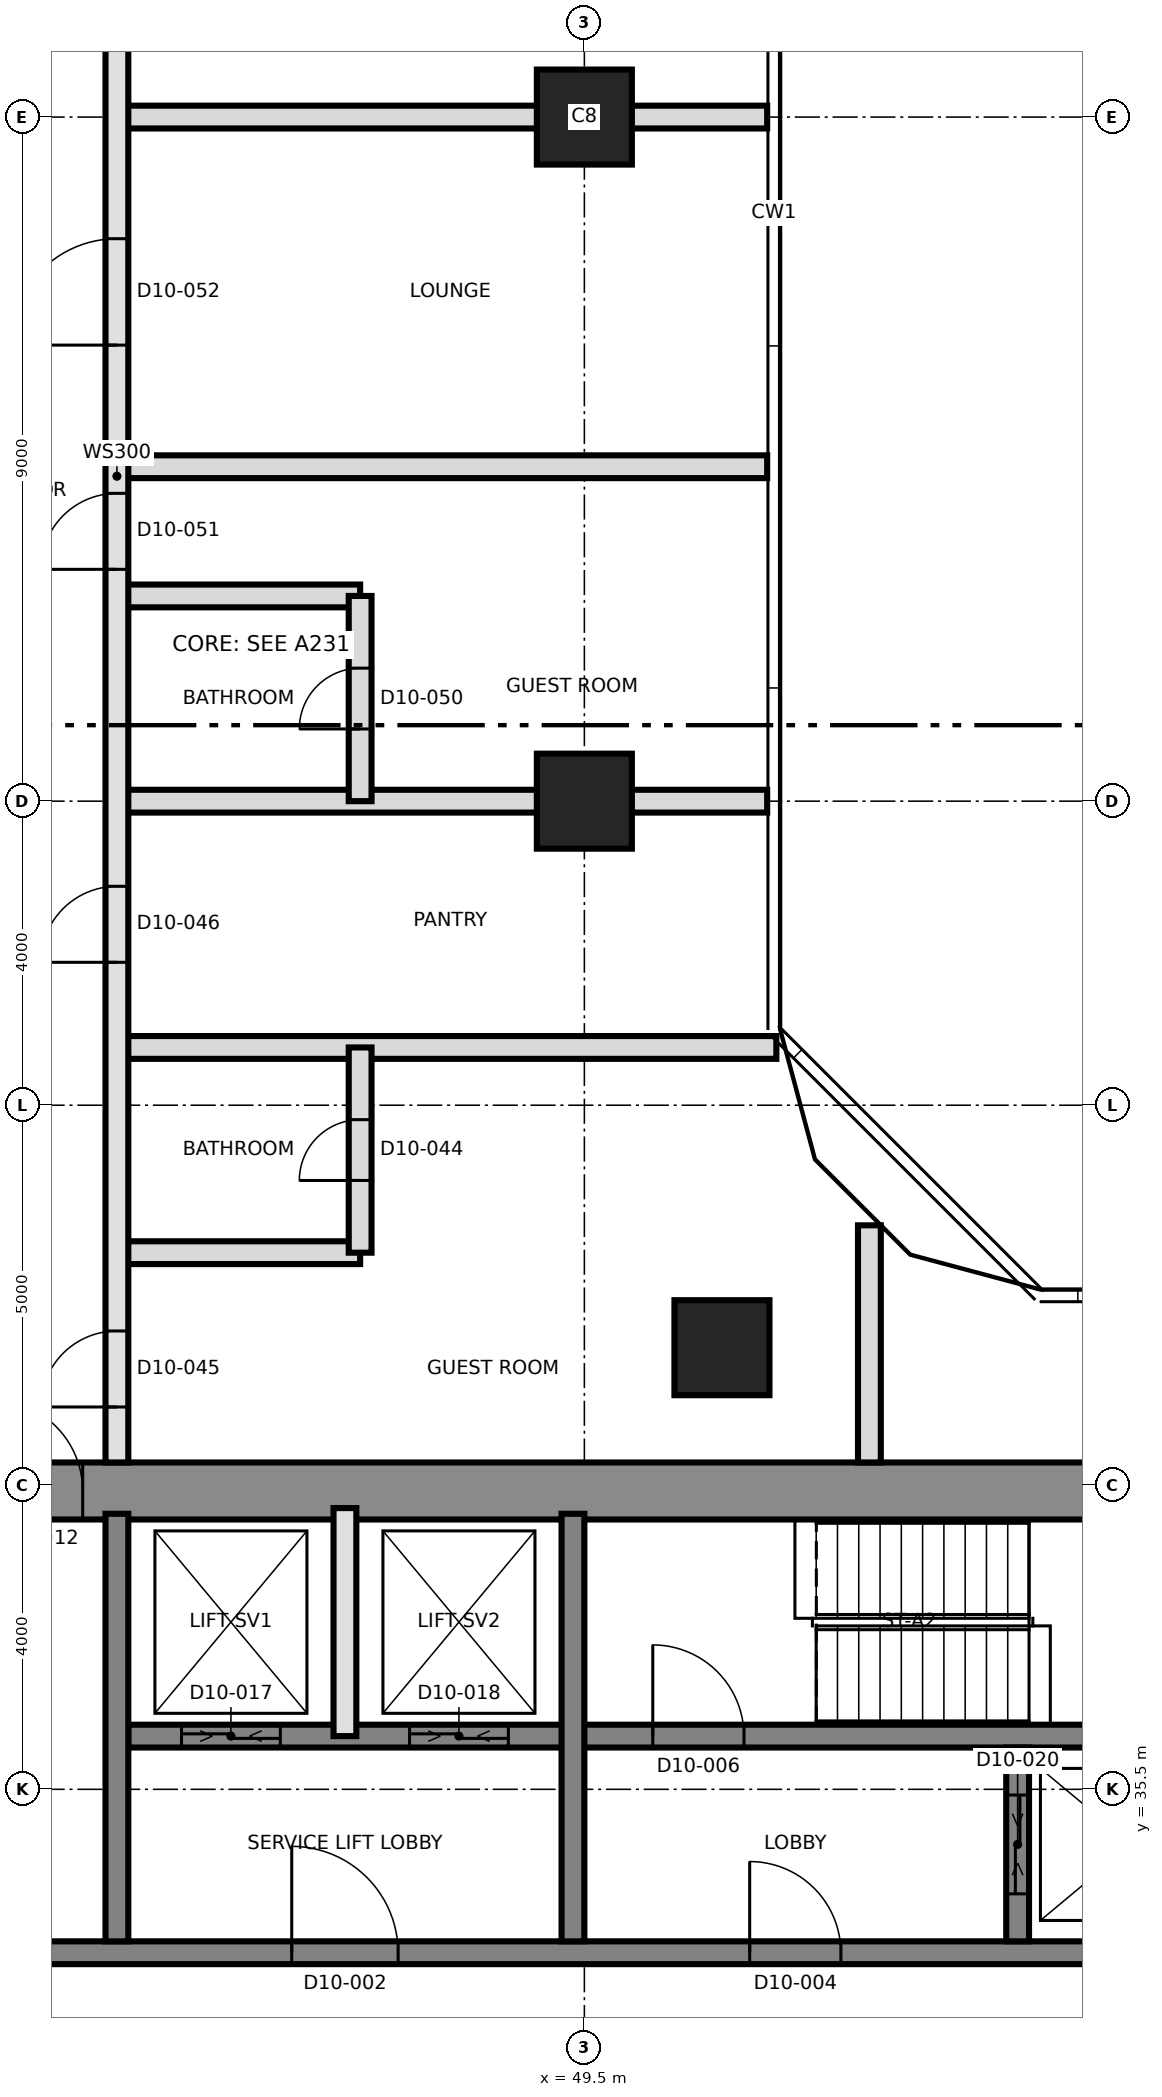
"""IFC4 building model, lengths in metres.
Left out: names, types, materials, properties, quantities, classifications, styles, units other than length and angle.
Written with IfcOpenShell. Run it as: python <this file> out.ifc"""

import sys

from ifc_helpers import new_model, si_unit, direction, frame, frame_2d, origin, origin_2d, place, context, subcontext, project, spatial, rectangle, extrude, element, fill, save


model = new_model("IFC4")
c1 = context("Model", 3, precision=1e-05, world=origin(), true_north=direction((0.0, 1.0)))
c2 = subcontext(c1, "Body", "Model", "MODEL_VIEW")
j1 = project(units=[si_unit("LENGTHUNIT", "METRE"), si_unit("PLANEANGLEUNIT", "RADIAN")], contexts=[c1])
p1 = place(None, origin())
s1 = spatial("IfcSite", under=j1, at=p1, CompositionType="ELEMENT")
p2 = place(p1, origin())
s2 = spatial("IfcBuilding", under=s1, at=p2, CompositionType="ELEMENT")
p3 = place(p2, frame((0.0, 0.0, 116.7)))
s3 = spatial("IfcBuildingStorey", under=s2, at=p3, CompositionType="ELEMENT", Elevation=116.7)
p4 = place(p3, frame((31.125, 39.425, 0.0), z_axis=(0.0, 0.0, 1.0), x_axis=(1.0, 0.0, 0.0)))
e1 = element("IfcWall", 1, at=p4, inside=s3, PredefinedType="SHEAR", context=c2, shape_type="SweptSolid", body=[
    extrude(rectangle(XDim=27.0, YDim=0.75, at=frame_2d((13.5, 0.0))), origin(), (0.0, 0.0, 1.0), 3.7),
])
p5 = place(p4, frame((10.575, 0.0, 0.0)))
e2 = element("IfcOpeningElement", 2, at=p5, cuts=e1, PredefinedType="OPENING", context=c2, shape_type="SweptSolid", body=[
    extrude(rectangle(XDim=1.2, YDim=2.1, at=frame_2d((0.6, 1.05))), frame((0.0, 0.385, 0.0), z_axis=(0.0, -1.0, 0.0), x_axis=(1.0, 0.0, 0.0)), (0.0, 0.0, 1.0), 0.77),
])
p6 = place(p3, frame((31.875, 33.35, 0.0), z_axis=(0.0, 0.0, 1.0), x_axis=(1.0, 0.0, 0.0)))
e3 = element("IfcWall", 3, at=p6, inside=s3, PredefinedType="SHEAR", context=c2, shape_type="SweptSolid", body=[
    extrude(rectangle(XDim=26.25, YDim=0.3, at=frame_2d((13.125, 0.0))), origin(), (0.0, 0.0, 1.0), 3.7),
])
p7 = place(p6, frame((13.775, 0.0, 0.0)))
e4 = element("IfcOpeningElement", 4, at=p7, cuts=e3, PredefinedType="OPENING", context=c2, shape_type="SweptSolid", body=[
    extrude(rectangle(XDim=1.4, YDim=2.1, at=frame_2d((0.7, 1.05))), frame((0.0, 0.16, 0.0), z_axis=(0.0, -1.0, 0.0), x_axis=(1.0, 0.0, 0.0)), (0.0, 0.0, 1.0), 0.32),
])
p8 = place(p6, frame((5.25, 0.0, 0.0)))
e5 = element("IfcOpeningElement", 5, at=p8, cuts=e3, PredefinedType="OPENING", context=c2, shape_type="SweptSolid", body=[
    extrude(rectangle(XDim=1.2, YDim=2.1, at=frame_2d((0.6, 1.05))), frame((0.0, 0.16, 0.0), z_axis=(0.0, -1.0, 0.0), x_axis=(1.0, 0.0, 0.0)), (0.0, 0.0, 1.0), 0.32),
])
p9 = place(p6, frame((19.8, 0.0, 0.0)))
e6 = element("IfcOpeningElement", 6, at=p9, cuts=e3, PredefinedType="OPENING", context=c2, shape_type="SweptSolid", body=[
    extrude(rectangle(XDim=1.2, YDim=2.1, at=frame_2d((0.6, 1.05))), frame((0.0, 0.16, 0.0), z_axis=(0.0, -1.0, 0.0), x_axis=(1.0, 0.0, 0.0)), (0.0, 0.0, 1.0), 0.32),
])
p10 = place(p3, frame((43.5, 36.2, 0.0), z_axis=(0.0, 0.0, 1.0), x_axis=(1.0, 0.0, 0.0)))
e7 = element("IfcWall", 7, at=p10, inside=s3, PredefinedType="SHEAR", context=c2, shape_type="SweptSolid", body=[
    extrude(rectangle(XDim=14.625, YDim=0.3, at=frame_2d((7.312, 0.0))), origin(), (0.0, 0.0, 1.0), 3.7),
])
p11 = place(p10, frame((6.9, 0.0, 0.0)))
e8 = element("IfcOpeningElement", 8, at=p11, cuts=e7, PredefinedType="OPENING", context=c2, shape_type="SweptSolid", body=[
    extrude(rectangle(XDim=1.2, YDim=2.1, at=frame_2d((0.6, 1.05))), frame((0.0, 0.16, 0.0), z_axis=(0.0, -1.0, 0.0), x_axis=(1.0, 0.0, 0.0)), (0.0, 0.0, 1.0), 0.32),
])
p12 = place(p10, frame((0.7, 0.0, 0.0)))
e9 = element("IfcOpeningElement", 9, at=p12, cuts=e7, PredefinedType="OPENING", context=c2, shape_type="SweptSolid", body=[
    extrude(rectangle(XDim=1.3, YDim=2.4, at=frame_2d((0.65, 1.2))), frame((0.0, 0.16, 0.0), z_axis=(0.0, -1.0, 0.0), x_axis=(1.0, 0.0, 0.0)), (0.0, 0.0, 1.0), 0.32),
])
p13 = place(p10, frame((3.7, 0.0, 0.0)))
e10 = element("IfcOpeningElement", 10, at=p13, cuts=e7, PredefinedType="OPENING", context=c2, shape_type="SweptSolid", body=[
    extrude(rectangle(XDim=1.3, YDim=2.4, at=frame_2d((0.65, 1.2))), frame((0.0, 0.16, 0.0), z_axis=(0.0, -1.0, 0.0), x_axis=(1.0, 0.0, 0.0)), (0.0, 0.0, 1.0), 0.32),
])
for number, where, z_axis, x_axis in (
    (11, (43.35, 33.5, 0.0), (0.0, 0.0, 1.0), (0.0, 1.0, 0.0)),
    (12, (49.35, 33.5, 0.0), (0.0, 0.0, 1.0), (0.0, 1.0, 0.0)),
):
    element("IfcWall", number, at=place(p3, frame(where, z_axis=z_axis, x_axis=x_axis)), inside=s3, PredefinedType="SHEAR", context=c2, shape_type="SweptSolid", body=[
        extrude(rectangle(XDim=5.625, YDim=0.3, at=frame_2d((2.812, 0.0))), origin(), (0.0, 0.0, 1.0), 3.7),
    ])
p14 = place(p3, frame((55.2, 33.5, 0.0), z_axis=(0.0, 0.0, 1.0), x_axis=(0.0, 1.0, 0.0)))
e13 = element("IfcWall", 13, at=p14, inside=s3, PredefinedType="SHEAR", context=c2, shape_type="SweptSolid", body=[
    extrude(rectangle(XDim=2.55, YDim=0.3, at=frame_2d((1.275, 0.0))), origin(), (0.0, 0.0, 1.0), 3.7),
])
p15 = place(p14, frame((0.625, 0.0, 0.0)))
e14 = element("IfcOpeningElement", 14, at=p15, cuts=e13, PredefinedType="OPENING", context=c2, shape_type="SweptSolid", body=[
    extrude(rectangle(XDim=1.3, YDim=2.4, at=frame_2d((0.65, 1.2))), frame((0.0, 0.16, 0.0), z_axis=(0.0, -1.0, 0.0), x_axis=(1.0, 0.0, 0.0)), (0.0, 0.0, 1.0), 0.32),
])
for number, where, z_axis, x_axis in (
    (15, (51.31, 41.31, 0.0), (0.0, 0.0, 1.0), (1.0, 0.0, 0.0)),
    (16, (49.5, 48.5, 0.0), (0.0, 0.0, 1.0), (1.0, 0.0, 0.0)),
    (17, (49.5, 57.5, 0.0), (0.0, 0.0, 1.0), (1.0, 0.0, 0.0)),
):
    element("IfcColumn", number, at=place(p3, frame(where, z_axis=z_axis, x_axis=x_axis)), inside=s3, PredefinedType="COLUMN", context=c2, shape_type="SweptSolid", body=[
        extrude(rectangle(XDim=1.25, YDim=1.25, at=origin_2d()), origin(), (0.0, 0.0, 1.0), 3.7),
    ])
p16 = place(p3, frame((46.35, 36.2, 0.0), z_axis=(0.0, 0.0, 1.0), x_axis=(0.0, 1.0, 0.0)))
e18 = element("IfcWall", 18, at=p16, inside=s3, PredefinedType="SOLIDWALL", context=c2, shape_type="SweptSolid", body=[
    extrude(rectangle(XDim=3.0, YDim=0.3, at=frame_2d((1.5, 0.0))), origin(), (0.0, 0.0, 1.0), 3.4),
])
p17 = place(p3, frame((43.35, 42.56, 0.0), z_axis=(0.0, 0.0, 1.0), x_axis=(1.0, 0.0, 0.0)))
e19 = element("IfcWall", 19, at=p17, inside=s3, PredefinedType="PARTITIONING", context=c2, shape_type="SweptSolid", body=[
    extrude(rectangle(XDim=3.2, YDim=0.3, at=frame_2d((1.6, 0.0))), origin(), (0.0, 0.0, 1.0), 3.4),
])
p18 = place(p3, frame((43.35, 45.26, 0.0), z_axis=(0.0, 0.0, 1.0), x_axis=(1.0, 0.0, 0.0)))
e20 = element("IfcWall", 20, at=p18, inside=s3, PredefinedType="PARTITIONING", context=c2, shape_type="SweptSolid", body=[
    extrude(rectangle(XDim=8.676, YDim=0.3, at=frame_2d((4.338, 0.0))), origin(), (0.0, 0.0, 1.0), 3.4),
])
p19 = place(p3, frame((43.35, 48.5, 0.0), z_axis=(0.0, 0.0, 1.0), x_axis=(1.0, 0.0, 0.0)))
e21 = element("IfcWall", 21, at=p19, inside=s3, PredefinedType="PARTITIONING", context=c2, shape_type="SweptSolid", body=[
    extrude(rectangle(XDim=8.555, YDim=0.3, at=frame_2d((4.277, 0.0))), origin(), (0.0, 0.0, 1.0), 3.4),
])
p20 = place(p3, frame((43.35, 51.2, 0.0), z_axis=(0.0, 0.0, 1.0), x_axis=(1.0, 0.0, 0.0)))
e22 = element("IfcWall", 22, at=p20, inside=s3, PredefinedType="PARTITIONING", context=c2, shape_type="SweptSolid", body=[
    extrude(rectangle(XDim=3.2, YDim=0.3, at=frame_2d((1.6, 0.0))), origin(), (0.0, 0.0, 1.0), 3.4),
])
for number, where, z_axis, x_axis in (
    (23, (43.35, 52.9, 0.0), (0.0, 0.0, 1.0), (1.0, 0.0, 0.0)),
    (24, (43.35, 57.5, 0.0), (0.0, 0.0, 1.0), (1.0, 0.0, 0.0)),
):
    element("IfcWall", number, at=place(p3, frame(where, z_axis=z_axis, x_axis=x_axis)), inside=s3, PredefinedType="PARTITIONING", context=c2, shape_type="SweptSolid", body=[
        extrude(rectangle(XDim=8.555, YDim=0.3, at=frame_2d((4.277, 0.0))), origin(), (0.0, 0.0, 1.0), 3.4),
    ])
p21 = place(p3, frame((43.35, 39.8, 0.0), z_axis=(0.0, 0.0, 1.0), x_axis=(0.0, 1.0, 0.0)))
e25 = element("IfcWall", 25, at=p21, inside=s3, PredefinedType="SOLIDWALL", context=c2, shape_type="SweptSolid", body=[
    extrude(rectangle(XDim=25.95, YDim=0.3, at=frame_2d((12.975, 0.0))), origin(), (0.0, 0.0, 1.0), 3.4),
])
p22 = place(p21, frame((0.73, 0.0, 0.0)))
e26 = element("IfcOpeningElement", 26, at=p22, cuts=e25, PredefinedType="OPENING", context=c2, shape_type="SweptSolid", body=[
    extrude(rectangle(XDim=1.0, YDim=2.1, at=frame_2d((0.5, 1.05))), frame((0.0, 0.16, 0.0), z_axis=(0.0, -1.0, 0.0), x_axis=(1.0, 0.0, 0.0)), (0.0, 0.0, 1.0), 0.32),
])
p23 = place(p21, frame((6.58, 0.0, 0.0)))
e27 = element("IfcOpeningElement", 27, at=p23, cuts=e25, PredefinedType="OPENING", context=c2, shape_type="SweptSolid", body=[
    extrude(rectangle(XDim=1.0, YDim=2.1, at=frame_2d((0.5, 1.05))), frame((0.0, 0.16, 0.0), z_axis=(0.0, -1.0, 0.0), x_axis=(1.0, 0.0, 0.0)), (0.0, 0.0, 1.0), 0.32),
])
p24 = place(p21, frame((11.75, 0.0, 0.0)))
e28 = element("IfcOpeningElement", 28, at=p24, cuts=e25, PredefinedType="OPENING", context=c2, shape_type="SweptSolid", body=[
    extrude(rectangle(XDim=1.0, YDim=2.1, at=frame_2d((0.5, 1.05))), frame((0.0, 0.16, 0.0), z_axis=(0.0, -1.0, 0.0), x_axis=(1.0, 0.0, 0.0)), (0.0, 0.0, 1.0), 0.32),
])
p25 = place(p21, frame((14.7, 0.0, 0.0)))
e29 = element("IfcOpeningElement", 29, at=p25, cuts=e25, PredefinedType="OPENING", context=c2, shape_type="SweptSolid", body=[
    extrude(rectangle(XDim=1.4, YDim=2.1, at=frame_2d((0.7, 1.05))), frame((0.0, 0.16, 0.0), z_axis=(0.0, -1.0, 0.0), x_axis=(1.0, 0.0, 0.0)), (0.0, 0.0, 1.0), 0.32),
])
p26 = place(p21, frame((19.7, 0.0, 0.0)))
e30 = element("IfcOpeningElement", 30, at=p26, cuts=e25, PredefinedType="OPENING", context=c2, shape_type="SweptSolid", body=[
    extrude(rectangle(XDim=1.0, YDim=2.4, at=frame_2d((0.5, 1.2))), frame((0.0, 0.16, 0.0), z_axis=(0.0, -1.0, 0.0), x_axis=(1.0, 0.0, 0.0)), (0.0, 0.0, 1.0), 0.32),
])
p27 = place(p3, frame((46.55, 42.56, 0.0), z_axis=(0.0, 0.0, 1.0), x_axis=(0.0, 1.0, 0.0)))
e31 = element("IfcWall", 31, at=p27, inside=s3, PredefinedType="PARTITIONING", context=c2, shape_type="SweptSolid", body=[
    extrude(rectangle(XDim=2.7, YDim=0.3, at=frame_2d((1.35, 0.0))), origin(), (0.0, 0.0, 1.0), 3.4),
])
p28 = place(p27, frame((0.95, 0.0, 0.0)))
e32 = element("IfcOpeningElement", 32, at=p28, cuts=e31, PredefinedType="OPENING", context=c2, shape_type="SweptSolid", body=[
    extrude(rectangle(XDim=0.8, YDim=2.1, at=frame_2d((0.4, 1.05))), frame((0.0, 0.16, 0.0), z_axis=(0.0, -1.0, 0.0), x_axis=(1.0, 0.0, 0.0)), (0.0, 0.0, 1.0), 0.32),
])
p29 = place(p3, frame((46.55, 48.5, 0.0), z_axis=(0.0, 0.0, 1.0), x_axis=(0.0, 1.0, 0.0)))
e33 = element("IfcWall", 33, at=p29, inside=s3, PredefinedType="PARTITIONING", context=c2, shape_type="SweptSolid", body=[
    extrude(rectangle(XDim=2.7, YDim=0.3, at=frame_2d((1.35, 0.0))), origin(), (0.0, 0.0, 1.0), 3.4),
])
p30 = place(p29, frame((0.95, 0.0, 0.0)))
e34 = element("IfcOpeningElement", 34, at=p30, cuts=e33, PredefinedType="OPENING", context=c2, shape_type="SweptSolid", body=[
    extrude(rectangle(XDim=0.8, YDim=2.1, at=frame_2d((0.4, 1.05))), frame((0.0, 0.16, 0.0), z_axis=(0.0, -1.0, 0.0), x_axis=(1.0, 0.0, 0.0)), (0.0, 0.0, 1.0), 0.32),
])
p31 = place(p3, frame((53.25, 39.8, 0.0), z_axis=(0.0, 0.0, 1.0), x_axis=(0.0, 1.0, 0.0)))
e35 = element("IfcWall", 35, at=p31, inside=s3, PredefinedType="PARTITIONING", context=c2, shape_type="SweptSolid", body=[
    extrude(rectangle(XDim=3.12, YDim=0.3, at=frame_2d((1.56, 0.0))), origin(), (0.0, 0.0, 1.0), 3.4),
])
p32 = place(p7, origin())
e36 = element("IfcDoor", 36, at=p32, inside=s3, OperationType="SINGLE_SWING_RIGHT", PredefinedType="DOOR", context=c2, shape_type="SweptSolid", body=[
    extrude(rectangle(XDim=1.4, YDim=2.1, at=frame_2d((0.7, 1.05))), frame((0.0, 0.025, 0.0), z_axis=(0.0, -1.0, 0.0), x_axis=(1.0, 0.0, 0.0)), (0.0, 0.0, 1.0), 0.05),
])
fill(e4, e36)
p33 = place(p9, origin())
e37 = element("IfcDoor", 37, at=p33, inside=s3, OperationType="SINGLE_SWING_RIGHT", PredefinedType="DOOR", context=c2, shape_type="SweptSolid", body=[
    extrude(rectangle(XDim=1.2, YDim=2.1, at=frame_2d((0.6, 1.05))), frame((0.0, 0.025, 0.0), z_axis=(0.0, -1.0, 0.0), x_axis=(1.0, 0.0, 0.0)), (0.0, 0.0, 1.0), 0.05),
])
fill(e6, e37)
p34 = place(p11, origin())
e38 = element("IfcDoor", 38, at=p34, inside=s3, OperationType="SINGLE_SWING_LEFT", PredefinedType="DOOR", context=c2, shape_type="SweptSolid", body=[
    extrude(rectangle(XDim=1.2, YDim=2.1, at=frame_2d((0.6, 1.05))), frame((0.0, 0.025, 0.0), z_axis=(0.0, -1.0, 0.0), x_axis=(1.0, 0.0, 0.0)), (0.0, 0.0, 1.0), 0.05),
])
fill(e8, e38)
p35 = place(p5, origin())
e39 = element("IfcDoor", 39, at=p35, inside=s3, OperationType="SINGLE_SWING_RIGHT", PredefinedType="DOOR", context=c2, shape_type="SweptSolid", body=[
    extrude(rectangle(XDim=1.2, YDim=2.1, at=frame_2d((0.6, 1.05))), frame((0.0, 0.025, 0.0), z_axis=(0.0, -1.0, 0.0), x_axis=(1.0, 0.0, 0.0)), (0.0, 0.0, 1.0), 0.05),
])
fill(e2, e39)
p36 = place(p12, origin())
e40 = element("IfcDoor", 40, at=p36, inside=s3, OperationType="SLIDING_TO_LEFT", PredefinedType="DOOR", context=c2, shape_type="SweptSolid", body=[
    extrude(rectangle(XDim=1.3, YDim=2.4, at=frame_2d((0.65, 1.2))), frame((0.0, 0.025, 0.0), z_axis=(0.0, -1.0, 0.0), x_axis=(1.0, 0.0, 0.0)), (0.0, 0.0, 1.0), 0.05),
])
fill(e9, e40)
p37 = place(p13, origin())
e41 = element("IfcDoor", 41, at=p37, inside=s3, OperationType="SLIDING_TO_LEFT", PredefinedType="DOOR", context=c2, shape_type="SweptSolid", body=[
    extrude(rectangle(XDim=1.3, YDim=2.4, at=frame_2d((0.65, 1.2))), frame((0.0, 0.025, 0.0), z_axis=(0.0, -1.0, 0.0), x_axis=(1.0, 0.0, 0.0)), (0.0, 0.0, 1.0), 0.05),
])
fill(e10, e41)
p38 = place(p15, origin())
e42 = element("IfcDoor", 42, at=p38, inside=s3, OperationType="SLIDING_TO_LEFT", PredefinedType="DOOR", context=c2, shape_type="SweptSolid", body=[
    extrude(rectangle(XDim=1.3, YDim=2.4, at=frame_2d((0.65, 1.2))), frame((0.0, 0.025, 0.0), z_axis=(0.0, -1.0, 0.0), x_axis=(1.0, 0.0, 0.0)), (0.0, 0.0, 1.0), 0.05),
])
fill(e14, e42)
p39 = place(p28, origin())
e43 = element("IfcDoor", 43, at=p39, inside=s3, OperationType="SINGLE_SWING_LEFT", PredefinedType="DOOR", context=c2, shape_type="SweptSolid", body=[
    extrude(rectangle(XDim=0.8, YDim=2.1, at=frame_2d((0.4, 1.05))), frame((0.0, 0.025, 0.0), z_axis=(0.0, -1.0, 0.0), x_axis=(1.0, 0.0, 0.0)), (0.0, 0.0, 1.0), 0.05),
])
fill(e32, e43)
p40 = place(p22, origin())
e44 = element("IfcDoor", 44, at=p40, inside=s3, OperationType="SINGLE_SWING_LEFT", PredefinedType="DOOR", context=c2, shape_type="SweptSolid", body=[
    extrude(rectangle(XDim=1.0, YDim=2.1, at=frame_2d((0.5, 1.05))), frame((0.0, 0.025, 0.0), z_axis=(0.0, -1.0, 0.0), x_axis=(1.0, 0.0, 0.0)), (0.0, 0.0, 1.0), 0.05),
])
fill(e26, e44)
p41 = place(p23, origin())
e45 = element("IfcDoor", 45, at=p41, inside=s3, OperationType="SINGLE_SWING_RIGHT", PredefinedType="DOOR", context=c2, shape_type="SweptSolid", body=[
    extrude(rectangle(XDim=1.0, YDim=2.1, at=frame_2d((0.5, 1.05))), frame((0.0, 0.025, 0.0), z_axis=(0.0, -1.0, 0.0), x_axis=(1.0, 0.0, 0.0)), (0.0, 0.0, 1.0), 0.05),
])
fill(e27, e45)
p42 = place(p30, origin())
e46 = element("IfcDoor", 46, at=p42, inside=s3, OperationType="SINGLE_SWING_LEFT", PredefinedType="DOOR", context=c2, shape_type="SweptSolid", body=[
    extrude(rectangle(XDim=0.8, YDim=2.1, at=frame_2d((0.4, 1.05))), frame((0.0, 0.025, 0.0), z_axis=(0.0, -1.0, 0.0), x_axis=(1.0, 0.0, 0.0)), (0.0, 0.0, 1.0), 0.05),
])
fill(e34, e46)
p43 = place(p24, origin())
e47 = element("IfcDoor", 47, at=p43, inside=s3, OperationType="SINGLE_SWING_LEFT", PredefinedType="DOOR", context=c2, shape_type="SweptSolid", body=[
    extrude(rectangle(XDim=1.0, YDim=2.1, at=frame_2d((0.5, 1.05))), frame((0.0, 0.025, 0.0), z_axis=(0.0, -1.0, 0.0), x_axis=(1.0, 0.0, 0.0)), (0.0, 0.0, 1.0), 0.05),
])
fill(e28, e47)
p44 = place(p25, origin())
e48 = element("IfcDoor", 48, at=p44, inside=s3, OperationType="SINGLE_SWING_RIGHT", PredefinedType="DOOR", context=c2, shape_type="SweptSolid", body=[
    extrude(rectangle(XDim=1.4, YDim=2.1, at=frame_2d((0.7, 1.05))), frame((0.0, 0.025, 0.0), z_axis=(0.0, -1.0, 0.0), x_axis=(1.0, 0.0, 0.0)), (0.0, 0.0, 1.0), 0.05),
])
fill(e29, e48)
save(model, sys.argv[1])
